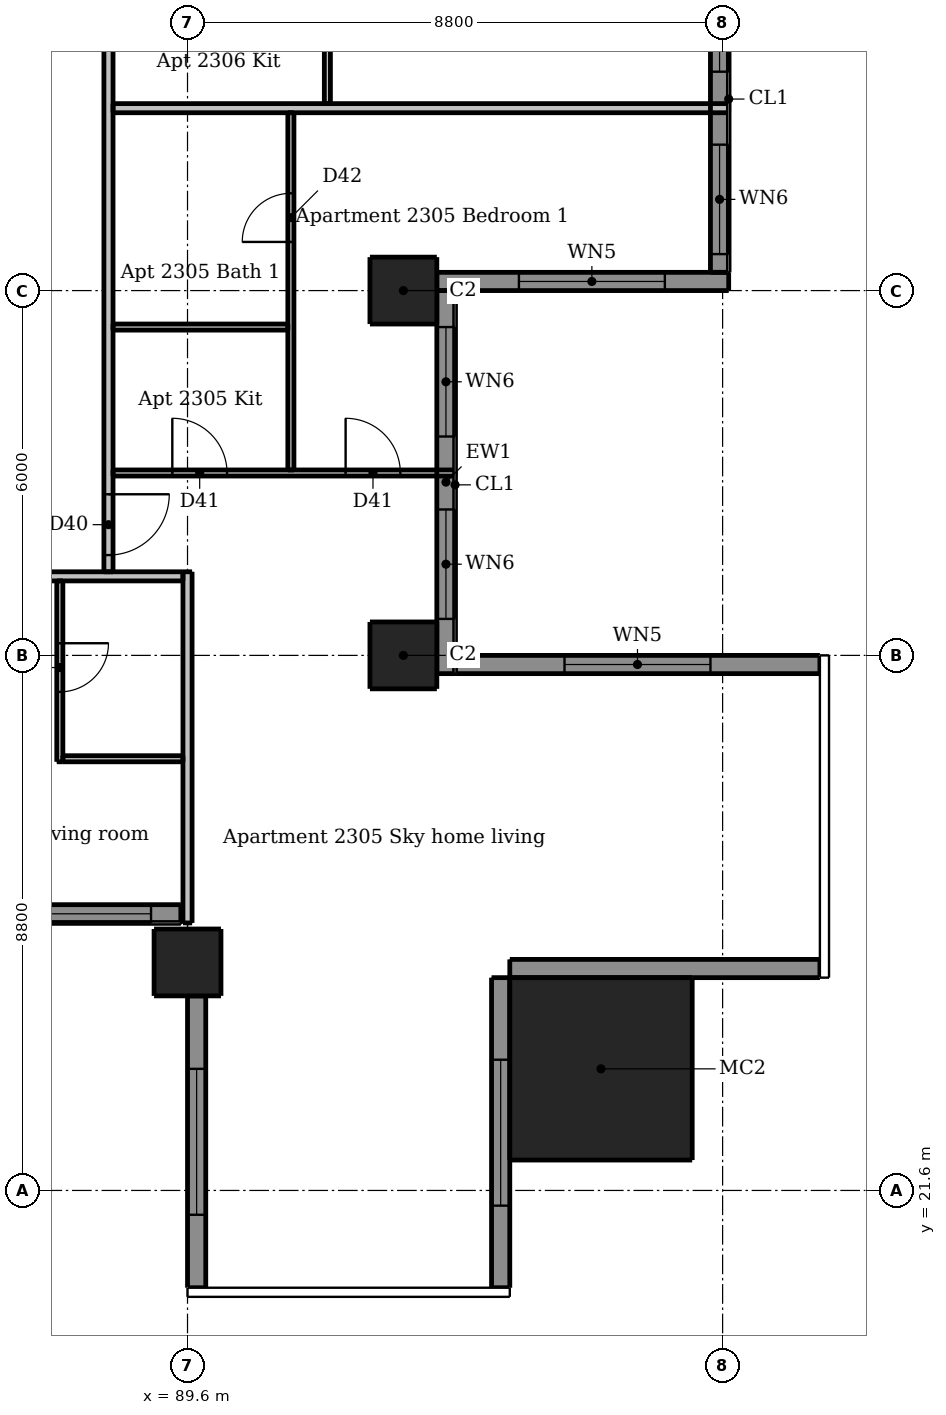
"""IFC4 building model, lengths in metres.
Left out: names, types, materials, properties, quantities, classifications, styles, units other than length and angle.
Written with IfcOpenShell. Run it as: python <this file> out.ifc"""

import sys

from ifc_helpers import new_model, si_unit, direction, frame, frame_2d, origin, origin_2d, place, context, subcontext, project, spatial, rectangle, extrude, element, fill, save


model = new_model("IFC4")
c1 = context("Model", 3, precision=1e-05, world=origin(), true_north=direction((0.0, 1.0)))
c2 = subcontext(c1, "Body", "Model", "MODEL_VIEW")
j1 = project(units=[si_unit("LENGTHUNIT", "METRE"), si_unit("PLANEANGLEUNIT", "RADIAN")], contexts=[c1])
p1 = place(None, origin())
s1 = spatial("IfcSite", under=j1, at=p1, CompositionType="ELEMENT")
p2 = place(p1, origin())
s2 = spatial("IfcBuilding", under=s1, at=p2, CompositionType="ELEMENT")
p3 = place(p2, frame((0.0, 0.0, 88.6)))
s3 = spatial("IfcBuildingStorey", under=s2, at=p3, CompositionType="ELEMENT", Elevation=88.6)
for number, where, z_axis, x_axis in (
    (1, (89.6, 25.35, 0.0), (0.0, 0.0, 1.0), (1.0, 0.0, 0.0)),
    (2, (93.15, 30.4, 0.0), (0.0, 0.0, 1.0), (1.0, 0.0, 0.0)),
    (3, (93.15, 36.4, 0.0), (0.0, 0.0, 1.0), (1.0, 0.0, 0.0)),
):
    element("IfcColumn", number, at=place(p3, frame(where, z_axis=z_axis, x_axis=x_axis)), inside=s3, PredefinedType="COLUMN", context=c2, shape_type="SweptSolid", body=[
        extrude(rectangle(XDim=1.1, YDim=1.1, at=origin_2d()), origin(), (0.0, 0.0, 1.0), 3.05),
    ])
p4 = place(p3, frame((96.4, 23.6, 0.0), z_axis=(0.0, 0.0, 1.0), x_axis=(1.0, 0.0, 0.0)))
e4 = element("IfcColumn", 4, at=p4, inside=s3, PredefinedType="COLUMN", context=c2, shape_type="SweptSolid", body=[
    extrude(rectangle(XDim=3.0, YDim=3.0, at=origin_2d()), origin(), (0.0, 0.0, 1.0), 3.3),
])
p5 = place(p3, frame((89.75, 24.8, 0.0), z_axis=(0.0, 0.0, 1.0), x_axis=(0.0, -1.0, 0.0)))
e5 = element("IfcWall", 5, at=p5, inside=s3, PredefinedType="SOLIDWALL", context=c2, shape_type="SweptSolid", body=[
    extrude(rectangle(XDim=4.8, YDim=0.3, at=frame_2d((2.4, 0.0))), origin(), (0.0, 0.0, 1.0), 3.05),
])
p6 = place(p5, frame((1.2, 0.0, 0.15)))
e6 = element("IfcOpeningElement", 6, at=p6, cuts=e5, PredefinedType="OPENING", context=c2, shape_type="SweptSolid", body=[
    extrude(rectangle(XDim=2.4, YDim=2.1, at=frame_2d((1.2, 1.05))), frame((0.0, 0.16, 0.0), z_axis=(0.0, -1.0, 0.0), x_axis=(1.0, 0.0, 0.0)), (0.0, 0.0, 1.0), 0.32),
])
p7 = place(p3, frame((94.75, 20.0, 0.0), z_axis=(0.0, 0.0, 1.0), x_axis=(0.0, 1.0, 0.0)))
e7 = element("IfcWall", 7, at=p7, inside=s3, PredefinedType="SOLIDWALL", context=c2, shape_type="SweptSolid", body=[
    extrude(rectangle(XDim=5.1, YDim=0.3, at=frame_2d((2.55, 0.0))), origin(), (0.0, 0.0, 1.0), 3.05),
])
p8 = place(p7, frame((1.35, 0.0, 0.15)))
e8 = element("IfcOpeningElement", 8, at=p8, cuts=e7, PredefinedType="OPENING", context=c2, shape_type="SweptSolid", body=[
    extrude(rectangle(XDim=2.4, YDim=2.1, at=frame_2d((1.2, 1.05))), frame((0.0, 0.16, 0.0), z_axis=(0.0, -1.0, 0.0), x_axis=(1.0, 0.0, 0.0)), (0.0, 0.0, 1.0), 0.32),
])
p9 = place(p3, frame((94.9, 25.25, 0.0), z_axis=(0.0, 0.0, 1.0), x_axis=(1.0, 0.0, 0.0)))
e9 = element("IfcWall", 9, at=p9, inside=s3, PredefinedType="SOLIDWALL", context=c2, shape_type="SweptSolid", body=[
    extrude(rectangle(XDim=5.1, YDim=0.3, at=frame_2d((2.55, 0.0))), origin(), (0.0, 0.0, 1.0), 3.05),
])
p10 = place(p3, frame((100.0, 30.25, 0.0), z_axis=(0.0, 0.0, 1.0), x_axis=(-1.0, 0.0, 0.0)))
e10 = element("IfcWall", 10, at=p10, inside=s3, PredefinedType="SOLIDWALL", context=c2, shape_type="SweptSolid", body=[
    extrude(rectangle(XDim=6.0, YDim=0.3, at=frame_2d((3.0, 0.0))), origin(), (0.0, 0.0, 1.0), 3.05),
])
p11 = place(p10, frame((1.8, 0.0, 0.15)))
e11 = element("IfcOpeningElement", 11, at=p11, cuts=e10, PredefinedType="OPENING", context=c2, shape_type="SweptSolid", body=[
    extrude(rectangle(XDim=2.4, YDim=2.1, at=frame_2d((1.2, 1.05))), frame((0.0, 0.16, 0.0), z_axis=(0.0, -1.0, 0.0), x_axis=(1.0, 0.0, 0.0)), (0.0, 0.0, 1.0), 0.32),
])
p12 = place(p3, frame((93.7, 36.55, 0.0), z_axis=(0.0, 0.0, 1.0), x_axis=(1.0, 0.0, 0.0)))
e12 = element("IfcWall", 12, at=p12, inside=s3, PredefinedType="SOLIDWALL", context=c2, shape_type="SweptSolid", body=[
    extrude(rectangle(XDim=4.8, YDim=0.3, at=frame_2d((2.4, 0.0))), origin(), (0.0, 0.0, 1.0), 3.05),
])
p13 = place(p12, frame((1.35, 0.0, 0.15)))
e13 = element("IfcOpeningElement", 13, at=p13, cuts=e12, PredefinedType="OPENING", context=c2, shape_type="SweptSolid", body=[
    extrude(rectangle(XDim=2.4, YDim=2.1, at=frame_2d((1.2, 1.05))), frame((0.0, 0.16, 0.0), z_axis=(0.0, -1.0, 0.0), x_axis=(1.0, 0.0, 0.0)), (0.0, 0.0, 1.0), 0.32),
])
p14 = place(p3, frame((83.7, 26.15, 0.0), z_axis=(0.0, 0.0, 1.0), x_axis=(1.0, 0.0, 0.0)))
e14 = element("IfcWall", 14, at=p14, inside=s3, PredefinedType="SOLIDWALL", context=c2, shape_type="SweptSolid", body=[
    extrude(rectangle(XDim=5.79, YDim=0.3, at=frame_2d((2.895, 0.0))), origin(), (0.0, 0.0, 1.0), 3.05),
])
p15 = place(p14, frame((0.5, 0.0, 0.15)))
e15 = element("IfcOpeningElement", 15, at=p15, cuts=e14, PredefinedType="OPENING", context=c2, shape_type="SweptSolid", body=[
    extrude(rectangle(XDim=1.8, YDim=2.1, at=frame_2d((0.9, 1.05))), frame((0.0, 0.16, 0.0), z_axis=(0.0, -1.0, 0.0), x_axis=(1.0, 0.0, 0.0)), (0.0, 0.0, 1.0), 0.32),
])
p16 = place(p14, frame((3.5, 0.0, 0.15)))
e16 = element("IfcOpeningElement", 16, at=p16, cuts=e14, PredefinedType="OPENING", context=c2, shape_type="SweptSolid", body=[
    extrude(rectangle(XDim=1.8, YDim=2.1, at=frame_2d((0.9, 1.05))), frame((0.0, 0.16, 0.0), z_axis=(0.0, -1.0, 0.0), x_axis=(1.0, 0.0, 0.0)), (0.0, 0.0, 1.0), 0.32),
])
p17 = place(p3, frame((93.85, 30.1, 0.0), z_axis=(0.0, 0.0, 1.0), x_axis=(0.0, 1.0, 0.0)))
e17 = element("IfcWall", 17, at=p17, inside=s3, PredefinedType="SOLIDWALL", context=c2, shape_type="SweptSolid", body=[
    extrude(rectangle(XDim=6.3, YDim=0.3, at=frame_2d((3.15, 0.0))), origin(), (0.0, 0.0, 1.0), 3.05),
])
p18 = place(p17, frame((0.9, 0.0, 0.15)))
e18 = element("IfcOpeningElement", 18, at=p18, cuts=e17, PredefinedType="OPENING", context=c2, shape_type="SweptSolid", body=[
    extrude(rectangle(XDim=1.8, YDim=2.1, at=frame_2d((0.9, 1.05))), frame((0.0, 0.16, 0.0), z_axis=(0.0, -1.0, 0.0), x_axis=(1.0, 0.0, 0.0)), (0.0, 0.0, 1.0), 0.32),
])
p19 = place(p17, frame((3.9, 0.0, 0.15)))
e19 = element("IfcOpeningElement", 19, at=p19, cuts=e17, PredefinedType="OPENING", context=c2, shape_type="SweptSolid", body=[
    extrude(rectangle(XDim=1.8, YDim=2.1, at=frame_2d((0.9, 1.05))), frame((0.0, 0.16, 0.0), z_axis=(0.0, -1.0, 0.0), x_axis=(1.0, 0.0, 0.0)), (0.0, 0.0, 1.0), 0.32),
])
p20 = place(p3, frame((98.35, 36.7, 0.0), z_axis=(0.0, 0.0, 1.0), x_axis=(0.0, 1.0, 0.0)))
e20 = element("IfcWall", 20, at=p20, inside=s3, PredefinedType="SOLIDWALL", context=c2, shape_type="SweptSolid", body=[
    extrude(rectangle(XDim=5.7, YDim=0.3, at=frame_2d((2.85, 0.0))), origin(), (0.0, 0.0, 1.0), 3.05),
])
p21 = place(p20, frame((0.3, 0.0, 0.15)))
e21 = element("IfcOpeningElement", 21, at=p21, cuts=e20, PredefinedType="OPENING", context=c2, shape_type="SweptSolid", body=[
    extrude(rectangle(XDim=1.8, YDim=2.1, at=frame_2d((0.9, 1.05))), frame((0.0, 0.16, 0.0), z_axis=(0.0, -1.0, 0.0), x_axis=(1.0, 0.0, 0.0)), (0.0, 0.0, 1.0), 0.32),
])
p22 = place(p20, frame((3.3, 0.0, 0.15)))
e22 = element("IfcOpeningElement", 22, at=p22, cuts=e20, PredefinedType="OPENING", context=c2, shape_type="SweptSolid", body=[
    extrude(rectangle(XDim=1.8, YDim=2.1, at=frame_2d((0.9, 1.05))), frame((0.0, 0.16, 0.0), z_axis=(0.0, -1.0, 0.0), x_axis=(1.0, 0.0, 0.0)), (0.0, 0.0, 1.0), 0.32),
])
p23 = place(p3, frame((87.5, 31.625, 0.0), z_axis=(0.0, 0.0, 1.0), x_axis=(0.0, -1.0, 0.0)))
e23 = element("IfcWall", 23, at=p23, inside=s3, PredefinedType="PARTITIONING", context=c2, shape_type="SweptSolid", body=[
    extrude(rectangle(XDim=2.975, YDim=0.1, at=frame_2d((1.488, 0.0))), origin(), (0.0, 0.0, 1.0), 3.05),
])
p24 = place(p23, frame((1.025, 0.0, 0.0)))
e24 = element("IfcOpeningElement", 24, at=p24, cuts=e23, PredefinedType="OPENING", context=c2, shape_type="SweptSolid", body=[
    extrude(rectangle(XDim=0.8, YDim=2.1, at=frame_2d((0.4, 1.05))), frame((0.0, 0.06, 0.0), z_axis=(0.0, -1.0, 0.0), x_axis=(1.0, 0.0, 0.0)), (0.0, 0.0, 1.0), 0.12),
])
p25 = place(p3, frame((91.3, 33.45, 0.0), z_axis=(0.0, 0.0, 1.0), x_axis=(0.0, 1.0, 0.0)))
e25 = element("IfcWall", 25, at=p25, inside=s3, PredefinedType="PARTITIONING", context=c2, shape_type="SweptSolid", body=[
    extrude(rectangle(XDim=5.875, YDim=0.1, at=frame_2d((2.938, 0.0))), origin(), (0.0, 0.0, 1.0), 3.05),
])
p26 = place(p25, frame((3.75, 0.0, 0.0)))
e26 = element("IfcOpeningElement", 26, at=p26, cuts=e25, PredefinedType="OPENING", context=c2, shape_type="SweptSolid", body=[
    extrude(rectangle(XDim=0.8, YDim=2.1, at=frame_2d((0.4, 1.05))), frame((0.0, 0.06, 0.0), z_axis=(0.0, -1.0, 0.0), x_axis=(1.0, 0.0, 0.0)), (0.0, 0.0, 1.0), 0.12),
])
p27 = place(p3, frame((91.9, 39.475, 0.0), z_axis=(0.0, 0.0, 1.0), x_axis=(0.0, 1.0, 0.0)))
e27 = element("IfcWall", 27, at=p27, inside=s3, PredefinedType="PARTITIONING", context=c2, shape_type="SweptSolid", body=[
    extrude(rectangle(XDim=2.075, YDim=0.1, at=frame_2d((1.038, 0.0))), origin(), (0.0, 0.0, 1.0), 3.05),
])
p28 = place(p3, frame((88.375, 35.8, 0.0), z_axis=(0.0, 0.0, 1.0), x_axis=(1.0, 0.0, 0.0)))
e28 = element("IfcWall", 28, at=p28, inside=s3, PredefinedType="PARTITIONING", context=c2, shape_type="SweptSolid", body=[
    extrude(rectangle(XDim=2.875, YDim=0.1, at=frame_2d((1.438, 0.0))), origin(), (0.0, 0.0, 1.0), 3.05),
])
p29 = place(p3, frame((88.375, 33.4, 0.0), z_axis=(0.0, 0.0, 1.0), x_axis=(1.0, 0.0, 0.0)))
e29 = element("IfcWall", 29, at=p29, inside=s3, PredefinedType="PARTITIONING", context=c2, shape_type="SweptSolid", body=[
    extrude(rectangle(XDim=5.625, YDim=0.1, at=frame_2d((2.812, 0.0))), origin(), (0.0, 0.0, 1.0), 3.05),
])
p30 = place(p29, frame((0.975, 0.0, 0.0)))
e30 = element("IfcOpeningElement", 30, at=p30, cuts=e29, PredefinedType="OPENING", context=c2, shape_type="SweptSolid", body=[
    extrude(rectangle(XDim=0.9, YDim=2.1, at=frame_2d((0.45, 1.05))), frame((0.0, 0.06, 0.0), z_axis=(0.0, -1.0, 0.0), x_axis=(1.0, 0.0, 0.0)), (0.0, 0.0, 1.0), 0.12),
])
p31 = place(p29, frame((3.825, 0.0, 0.0)))
e31 = element("IfcOpeningElement", 31, at=p31, cuts=e29, PredefinedType="OPENING", context=c2, shape_type="SweptSolid", body=[
    extrude(rectangle(XDim=0.9, YDim=2.1, at=frame_2d((0.45, 1.05))), frame((0.0, 0.06, 0.0), z_axis=(0.0, -1.0, 0.0), x_axis=(1.0, 0.0, 0.0)), (0.0, 0.0, 1.0), 0.12),
])
p32 = place(p3, frame((87.55, 28.7, 0.0), z_axis=(0.0, 0.0, 1.0), x_axis=(1.0, 0.0, 0.0)))
e32 = element("IfcWall", 32, at=p32, inside=s3, PredefinedType="PARTITIONING", context=c2, shape_type="SweptSolid", body=[
    extrude(rectangle(XDim=1.975, YDim=0.1, at=frame_2d((0.987, 0.0))), origin(), (0.0, 0.0, 1.0), 3.05),
])
p33 = place(p3, frame((88.3, 60.475, 0.0), z_axis=(0.0, 0.0, 1.0), x_axis=(0.0, -1.0, 0.0)))
e33 = element("IfcWall", 33, at=p33, inside=s3, PredefinedType="PARTITIONING", context=c2, shape_type="SweptSolid", body=[
    extrude(rectangle(XDim=28.7, YDim=0.15, at=frame_2d((14.35, 0.0))), origin(), (0.0, 0.0, 1.0), 3.05),
])
p34 = place(p33, frame((27.425, 0.0, 0.0)))
e34 = element("IfcOpeningElement", 34, at=p34, cuts=e33, PredefinedType="OPENING", context=c2, shape_type="SweptSolid", body=[
    extrude(rectangle(XDim=1.0, YDim=2.1, at=frame_2d((0.5, 1.05))), frame((0.0, 0.085, 0.0), z_axis=(0.0, -1.0, 0.0), x_axis=(1.0, 0.0, 0.0)), (0.0, 0.0, 1.0), 0.17),
])
p35 = place(p33, frame((17.575, 0.0, 0.0)))
e35 = element("IfcOpeningElement", 35, at=p35, cuts=e33, PredefinedType="OPENING", context=c2, shape_type="SweptSolid", body=[
    extrude(rectangle(XDim=1.0, YDim=2.1, at=frame_2d((0.5, 1.05))), frame((0.0, 0.085, 0.0), z_axis=(0.0, -1.0, 0.0), x_axis=(1.0, 0.0, 0.0)), (0.0, 0.0, 1.0), 0.17),
])
p36 = place(p33, frame((11.575, 0.0, 0.0)))
e36 = element("IfcOpeningElement", 36, at=p36, cuts=e33, PredefinedType="OPENING", context=c2, shape_type="SweptSolid", body=[
    extrude(rectangle(XDim=1.0, YDim=2.1, at=frame_2d((0.5, 1.05))), frame((0.0, 0.085, 0.0), z_axis=(0.0, -1.0, 0.0), x_axis=(1.0, 0.0, 0.0)), (0.0, 0.0, 1.0), 0.17),
])
p37 = place(p33, frame((3.775, 0.0, 0.0)))
e37 = element("IfcOpeningElement", 37, at=p37, cuts=e33, PredefinedType="OPENING", context=c2, shape_type="SweptSolid", body=[
    extrude(rectangle(XDim=1.0, YDim=2.1, at=frame_2d((0.5, 1.05))), frame((0.0, 0.085, 0.0), z_axis=(0.0, -1.0, 0.0), x_axis=(1.0, 0.0, 0.0)), (0.0, 0.0, 1.0), 0.17),
])
p38 = place(p3, frame((89.6, 26.0, 0.0), z_axis=(0.0, 0.0, 1.0), x_axis=(0.0, 1.0, 0.0)))
e38 = element("IfcWall", 38, at=p38, inside=s3, PredefinedType="PARTITIONING", context=c2, shape_type="SweptSolid", body=[
    extrude(rectangle(XDim=5.775, YDim=0.15, at=frame_2d((2.887, 0.0))), origin(), (0.0, 0.0, 1.0), 2.516),
])
p39 = place(p3, frame((88.375, 39.4, 0.0), z_axis=(0.0, 0.0, 1.0), x_axis=(1.0, 0.0, 0.0)))
e39 = element("IfcWall", 39, at=p39, inside=s3, PredefinedType="PARTITIONING", context=c2, shape_type="SweptSolid", body=[
    extrude(rectangle(XDim=10.125, YDim=0.15, at=frame_2d((5.062, 0.0))), origin(), (0.0, 0.0, 1.0), 3.05),
])
p40 = place(p3, frame((89.525, 31.7, 0.0), z_axis=(0.0, 0.0, 1.0), x_axis=(-1.0, 0.0, 0.0)))
e40 = element("IfcWall", 40, at=p40, inside=s3, PredefinedType="PARTITIONING", context=c2, shape_type="SweptSolid", body=[
    extrude(rectangle(XDim=28.75, YDim=0.15, at=frame_2d((14.375, 0.0))), origin(), (0.0, 0.0, 1.0), 3.05),
])
p41 = place(p40, frame((25.875, 0.0, 0.0)))
e41 = element("IfcOpeningElement", 41, at=p41, cuts=e40, PredefinedType="OPENING", context=c2, shape_type="SweptSolid", body=[
    extrude(rectangle(XDim=1.0, YDim=2.1, at=frame_2d((0.5, 1.05))), frame((0.0, 0.085, 0.0), z_axis=(0.0, -1.0, 0.0), x_axis=(1.0, 0.0, 0.0)), (0.0, 0.0, 1.0), 0.17),
])
p42 = place(p40, frame((14.425, 0.0, 0.0)))
e42 = element("IfcOpeningElement", 42, at=p42, cuts=e40, PredefinedType="OPENING", context=c2, shape_type="SweptSolid", body=[
    extrude(rectangle(XDim=1.0, YDim=2.1, at=frame_2d((0.5, 1.05))), frame((0.0, 0.085, 0.0), z_axis=(0.0, -1.0, 0.0), x_axis=(1.0, 0.0, 0.0)), (0.0, 0.0, 1.0), 0.17),
])
p43 = place(p40, frame((8.425, 0.0, 0.0)))
e43 = element("IfcOpeningElement", 43, at=p43, cuts=e40, PredefinedType="OPENING", context=c2, shape_type="SweptSolid", body=[
    extrude(rectangle(XDim=1.0, YDim=2.1, at=frame_2d((0.5, 1.05))), frame((0.0, 0.085, 0.0), z_axis=(0.0, -1.0, 0.0), x_axis=(1.0, 0.0, 0.0)), (0.0, 0.0, 1.0), 0.17),
])
p44 = place(p40, frame((2.425, 0.0, 0.0)))
e44 = element("IfcOpeningElement", 44, at=p44, cuts=e40, PredefinedType="OPENING", context=c2, shape_type="SweptSolid", body=[
    extrude(rectangle(XDim=1.0, YDim=2.1, at=frame_2d((0.5, 1.05))), frame((0.0, 0.085, 0.0), z_axis=(0.0, -1.0, 0.0), x_axis=(1.0, 0.0, 0.0)), (0.0, 0.0, 1.0), 0.17),
])
p45 = place(p6, origin())
e45 = element("IfcWindow", 45, at=p45, inside=s3, PartitioningType="DOUBLE_PANEL_VERTICAL", PredefinedType="WINDOW", context=c2, shape_type="SweptSolid", body=[
    extrude(rectangle(XDim=2.4, YDim=2.1, at=frame_2d((1.2, 1.05))), frame((0.0, 0.03, 0.0), z_axis=(0.0, -1.0, 0.0), x_axis=(1.0, 0.0, 0.0)), (0.0, 0.0, 1.0), 0.06),
])
fill(e6, e45)
p46 = place(p8, origin())
e46 = element("IfcWindow", 46, at=p46, inside=s3, PartitioningType="DOUBLE_PANEL_VERTICAL", PredefinedType="WINDOW", context=c2, shape_type="SweptSolid", body=[
    extrude(rectangle(XDim=2.4, YDim=2.1, at=frame_2d((1.2, 1.05))), frame((0.0, 0.03, 0.0), z_axis=(0.0, -1.0, 0.0), x_axis=(1.0, 0.0, 0.0)), (0.0, 0.0, 1.0), 0.06),
])
fill(e8, e46)
p47 = place(p11, origin())
e47 = element("IfcWindow", 47, at=p47, inside=s3, PartitioningType="DOUBLE_PANEL_VERTICAL", PredefinedType="WINDOW", context=c2, shape_type="SweptSolid", body=[
    extrude(rectangle(XDim=2.4, YDim=2.1, at=frame_2d((1.2, 1.05))), frame((0.0, 0.03, 0.0), z_axis=(0.0, -1.0, 0.0), x_axis=(1.0, 0.0, 0.0)), (0.0, 0.0, 1.0), 0.06),
])
fill(e11, e47)
p48 = place(p13, origin())
e48 = element("IfcWindow", 48, at=p48, inside=s3, PartitioningType="DOUBLE_PANEL_VERTICAL", PredefinedType="WINDOW", context=c2, shape_type="SweptSolid", body=[
    extrude(rectangle(XDim=2.4, YDim=2.1, at=frame_2d((1.2, 1.05))), frame((0.0, 0.03, 0.0), z_axis=(0.0, -1.0, 0.0), x_axis=(1.0, 0.0, 0.0)), (0.0, 0.0, 1.0), 0.06),
])
fill(e13, e48)
p49 = place(p16, origin())
e49 = element("IfcWindow", 49, at=p49, inside=s3, PartitioningType="DOUBLE_PANEL_VERTICAL", PredefinedType="WINDOW", context=c2, shape_type="SweptSolid", body=[
    extrude(rectangle(XDim=1.8, YDim=2.1, at=frame_2d((0.9, 1.05))), frame((0.0, 0.03, 0.0), z_axis=(0.0, -1.0, 0.0), x_axis=(1.0, 0.0, 0.0)), (0.0, 0.0, 1.0), 0.06),
])
fill(e16, e49)
p50 = place(p18, origin())
e50 = element("IfcWindow", 50, at=p50, inside=s3, PartitioningType="DOUBLE_PANEL_VERTICAL", PredefinedType="WINDOW", context=c2, shape_type="SweptSolid", body=[
    extrude(rectangle(XDim=1.8, YDim=2.1, at=frame_2d((0.9, 1.05))), frame((0.0, 0.03, 0.0), z_axis=(0.0, -1.0, 0.0), x_axis=(1.0, 0.0, 0.0)), (0.0, 0.0, 1.0), 0.06),
])
fill(e18, e50)
p51 = place(p19, origin())
e51 = element("IfcWindow", 51, at=p51, inside=s3, PartitioningType="DOUBLE_PANEL_VERTICAL", PredefinedType="WINDOW", context=c2, shape_type="SweptSolid", body=[
    extrude(rectangle(XDim=1.8, YDim=2.1, at=frame_2d((0.9, 1.05))), frame((0.0, 0.03, 0.0), z_axis=(0.0, -1.0, 0.0), x_axis=(1.0, 0.0, 0.0)), (0.0, 0.0, 1.0), 0.06),
])
fill(e19, e51)
p52 = place(p21, origin())
e52 = element("IfcWindow", 52, at=p52, inside=s3, PartitioningType="DOUBLE_PANEL_VERTICAL", PredefinedType="WINDOW", context=c2, shape_type="SweptSolid", body=[
    extrude(rectangle(XDim=1.8, YDim=2.1, at=frame_2d((0.9, 1.05))), frame((0.0, 0.03, 0.0), z_axis=(0.0, -1.0, 0.0), x_axis=(1.0, 0.0, 0.0)), (0.0, 0.0, 1.0), 0.06),
])
fill(e21, e52)
p53 = place(p22, origin())
e53 = element("IfcWindow", 53, at=p53, inside=s3, PartitioningType="DOUBLE_PANEL_VERTICAL", PredefinedType="WINDOW", context=c2, shape_type="SweptSolid", body=[
    extrude(rectangle(XDim=1.8, YDim=2.1, at=frame_2d((0.9, 1.05))), frame((0.0, 0.03, 0.0), z_axis=(0.0, -1.0, 0.0), x_axis=(1.0, 0.0, 0.0)), (0.0, 0.0, 1.0), 0.06),
])
fill(e22, e53)
p54 = place(p24, origin())
e54 = element("IfcDoor", 54, at=p54, inside=s3, OperationType="SINGLE_SWING_LEFT", PredefinedType="DOOR", context=c2, shape_type="SweptSolid", body=[
    extrude(rectangle(XDim=0.8, YDim=2.1, at=frame_2d((0.4, 1.05))), frame((0.0, 0.025, 0.0), z_axis=(0.0, -1.0, 0.0), x_axis=(1.0, 0.0, 0.0)), (0.0, 0.0, 1.0), 0.05),
])
fill(e24, e54)
p55 = place(p34, origin())
e55 = element("IfcDoor", 55, at=p55, inside=s3, OperationType="SINGLE_SWING_LEFT", PredefinedType="DOOR", context=c2, shape_type="SweptSolid", body=[
    extrude(rectangle(XDim=1.0, YDim=2.1, at=frame_2d((0.5, 1.05))), frame((0.0, 0.025, 0.0), z_axis=(0.0, -1.0, 0.0), x_axis=(1.0, 0.0, 0.0)), (0.0, 0.0, 1.0), 0.05),
])
fill(e34, e55)
p56 = place(p30, origin())
e56 = element("IfcDoor", 56, at=p56, inside=s3, OperationType="SINGLE_SWING_LEFT", PredefinedType="DOOR", context=c2, shape_type="SweptSolid", body=[
    extrude(rectangle(XDim=0.9, YDim=2.1, at=frame_2d((0.45, 1.05))), frame((0.0, 0.025, 0.0), z_axis=(0.0, -1.0, 0.0), x_axis=(1.0, 0.0, 0.0)), (0.0, 0.0, 1.0), 0.05),
])
fill(e30, e56)
p57 = place(p31, origin())
e57 = element("IfcDoor", 57, at=p57, inside=s3, OperationType="SINGLE_SWING_LEFT", PredefinedType="DOOR", context=c2, shape_type="SweptSolid", body=[
    extrude(rectangle(XDim=0.9, YDim=2.1, at=frame_2d((0.45, 1.05))), frame((0.0, 0.025, 0.0), z_axis=(0.0, -1.0, 0.0), x_axis=(1.0, 0.0, 0.0)), (0.0, 0.0, 1.0), 0.05),
])
fill(e31, e57)
p58 = place(p26, origin())
e58 = element("IfcDoor", 58, at=p58, inside=s3, OperationType="SINGLE_SWING_LEFT", PredefinedType="DOOR", context=c2, shape_type="SweptSolid", body=[
    extrude(rectangle(XDim=0.8, YDim=2.1, at=frame_2d((0.4, 1.05))), frame((0.0, 0.025, 0.0), z_axis=(0.0, -1.0, 0.0), x_axis=(1.0, 0.0, 0.0)), (0.0, 0.0, 1.0), 0.05),
])
fill(e26, e58)
save(model, sys.argv[1])
